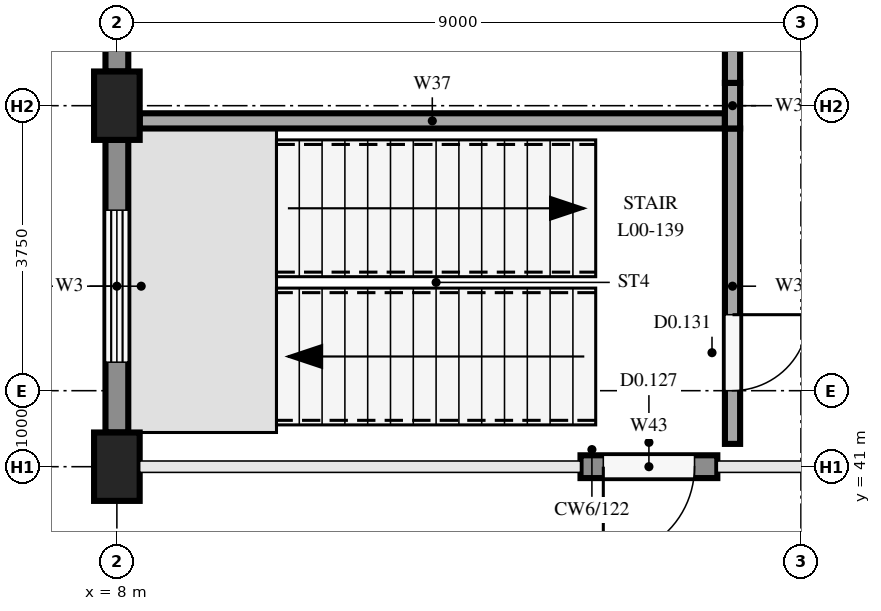
"""IFC4 building model, lengths in metres.
Left out: names, types, materials, properties, quantities, classifications, styles, units other than length and angle.
Written with IfcOpenShell. Run it as: python <this file> out.ifc"""

import sys

from ifc_helpers import new_model, si_unit, direction, frame, frame_2d, origin, origin_2d, place, context, subcontext, project, spatial, rectangle, extrude, element, fill, save


model = new_model("IFC4")
c1 = context("Model", 3, precision=1e-05, world=origin(), true_north=direction((0.0, 1.0)))
c2 = subcontext(c1, "Body", "Model", "MODEL_VIEW")
j1 = project(units=[si_unit("LENGTHUNIT", "METRE"), si_unit("PLANEANGLEUNIT", "RADIAN")], contexts=[c1])
p1 = place(None, origin())
s1 = spatial("IfcSite", under=j1, at=p1, CompositionType="ELEMENT")
p2 = place(p1, origin())
s2 = spatial("IfcBuilding", under=s1, at=p2, CompositionType="ELEMENT")
p3 = place(p2, origin())
s3 = spatial("IfcBuildingStorey", under=s2, at=p3, CompositionType="ELEMENT", Elevation=0.0)
for number, where, z_axis, x_axis in (
    (1, (8.0, 41.0, 0.0), (0.0, 0.0, 1.0), (1.0, 0.0, 0.0)),
    (2, (8.0, 45.75, 0.0), (0.0, 0.0, 1.0), (1.0, 0.0, 0.0)),
):
    element("IfcColumn", number, at=place(p3, frame(where, z_axis=z_axis, x_axis=x_axis)), inside=s3, PredefinedType="COLUMN", context=c2, shape_type="SweptSolid", body=[
        extrude(rectangle(XDim=0.6, YDim=0.9, at=origin_2d()), origin(), (0.0, 0.0, 1.0), 4.5),
    ])
p4 = place(p3, frame((8.0, 41.45, 0.0), z_axis=(0.0, 0.0, 1.0), x_axis=(0.0, 1.0, 0.0)))
e3 = element("IfcWall", 3, at=p4, inside=s3, PredefinedType="SOLIDWALL", context=c2, shape_type="SweptSolid", body=[
    extrude(rectangle(XDim=3.85, YDim=0.3, at=frame_2d((1.925, 0.0))), origin(), (0.0, 0.0, 1.0), 4.15),
])
p5 = place(p4, frame((0.925, 0.0, 1.0)))
e4 = element("IfcOpeningElement", 4, at=p5, cuts=e3, PredefinedType="OPENING", context=c2, shape_type="SweptSolid", body=[
    extrude(rectangle(XDim=2.0, YDim=2.0, at=frame_2d((1.0, 1.0))), frame((0.0, 0.16, 0.0), z_axis=(0.0, -1.0, 0.0), x_axis=(1.0, 0.0, 0.0)), (0.0, 0.0, 1.0), 0.32),
])
p6 = place(p3, frame((8.0, 46.2, 0.0), z_axis=(0.0, 0.0, 1.0), x_axis=(0.0, 1.0, 0.0)))
e5 = element("IfcWall", 5, at=p6, inside=s3, PredefinedType="SOLIDWALL", context=c2, shape_type="SweptSolid", body=[
    extrude(rectangle(XDim=3.85, YDim=0.3, at=frame_2d((1.925, 0.0))), origin(), (0.0, 0.0, 1.0), 4.15),
])
p7 = place(p6, frame((0.925, 0.0, 1.0)))
e6 = element("IfcOpeningElement", 6, at=p7, cuts=e5, PredefinedType="OPENING", context=c2, shape_type="SweptSolid", body=[
    extrude(rectangle(XDim=2.0, YDim=2.0, at=frame_2d((1.0, 1.0))), frame((0.0, 0.16, 0.0), z_axis=(0.0, -1.0, 0.0), x_axis=(1.0, 0.0, 0.0)), (0.0, 0.0, 1.0), 0.32),
])
p8 = place(p3, frame((14.1, 41.0, 0.0), z_axis=(0.0, 0.0, 1.0), x_axis=(1.0, 0.0, 0.0)))
e7 = element("IfcWall", 7, at=p8, inside=s3, PredefinedType="SOLIDWALL", context=c2, shape_type="SweptSolid", body=[
    extrude(rectangle(XDim=1.8, YDim=0.3, at=frame_2d((0.9, 0.0))), origin(), (0.0, 0.0, 1.0), 3.05),
])
p9 = place(p8, frame((0.3, 0.0, 0.0)))
e8 = element("IfcOpeningElement", 8, at=p9, cuts=e7, PredefinedType="OPENING", context=c2, shape_type="SweptSolid", body=[
    extrude(rectangle(XDim=1.2, YDim=2.1, at=frame_2d((0.6, 1.05))), frame((0.0, 0.16, 0.0), z_axis=(0.0, -1.0, 0.0), x_axis=(1.0, 0.0, 0.0)), (0.0, 0.0, 1.0), 0.32),
])
p10 = place(p3, frame((8.3, 45.55, 0.0), z_axis=(0.0, 0.0, 1.0), x_axis=(1.0, 0.0, 0.0)))
e9 = element("IfcWall", 9, at=p10, inside=s3, PredefinedType="SOLIDWALL", context=c2, shape_type="SweptSolid", body=[
    extrude(rectangle(XDim=7.7, YDim=0.2, at=frame_2d((3.85, 0.0))), origin(), (0.0, 0.0, 1.0), 3.05),
])
p11 = place(p3, frame((16.1, 41.3, 0.0), z_axis=(0.0, 0.0, 1.0), x_axis=(0.0, 1.0, 0.0)))
e10 = element("IfcWall", 10, at=p11, inside=s3, PredefinedType="SOLIDWALL", context=c2, shape_type="SweptSolid", body=[
    extrude(rectangle(XDim=4.15, YDim=0.2, at=frame_2d((2.075, 0.0))), origin(), (0.0, 0.0, 1.0), 4.15),
])
p12 = place(p11, frame((0.7, 0.0, 0.0)))
e11 = element("IfcOpeningElement", 11, at=p12, cuts=e10, PredefinedType="OPENING", context=c2, shape_type="SweptSolid", body=[
    extrude(rectangle(XDim=1.0, YDim=2.1, at=frame_2d((0.5, 1.05))), frame((0.0, 0.11, 0.0), z_axis=(0.0, -1.0, 0.0), x_axis=(1.0, 0.0, 0.0)), (0.0, 0.0, 1.0), 0.22),
])
p13 = place(p3, frame((16.1, 45.45, 0.0), z_axis=(0.0, 0.0, 1.0), x_axis=(0.0, 1.0, 0.0)))
e12 = element("IfcWall", 12, at=p13, inside=s3, PredefinedType="PARTITIONING", context=c2, shape_type="SweptSolid", body=[
    extrude(rectangle(XDim=0.6, YDim=0.2, at=frame_2d((0.3, 0.0))), origin(), (0.0, 0.0, 1.0), 3.05),
])
p14 = place(p3, frame((16.1, 46.05, 0.0), z_axis=(0.0, 0.0, 1.0), x_axis=(0.0, 1.0, 0.0)))
e13 = element("IfcWall", 13, at=p14, inside=s3, PredefinedType="PARTITIONING", context=c2, shape_type="SweptSolid", body=[
    extrude(rectangle(XDim=4.15, YDim=0.2, at=frame_2d((2.075, 0.0))), origin(), (0.0, 0.0, 1.0), 4.15),
])
p15 = place(p5, origin())
e14 = element("IfcWindow", 14, at=p15, inside=s3, PartitioningType="SINGLE_PANEL", PredefinedType="WINDOW", context=c2, shape_type="SweptSolid", body=[
    extrude(rectangle(XDim=2.0, YDim=2.0, at=frame_2d((1.0, 1.0))), frame((0.0, 0.03, 0.0), z_axis=(0.0, -1.0, 0.0), x_axis=(1.0, 0.0, 0.0)), (0.0, 0.0, 1.0), 0.06),
])
fill(e4, e14)
p16 = place(p9, frame((1.2, 0.0, 0.0), z_axis=(0.0, 0.0, 1.0), x_axis=(-1.0, 0.0, 0.0)))
e15 = element("IfcDoor", 15, at=p16, inside=s3, OperationType="SINGLE_SWING_LEFT", PredefinedType="DOOR", context=c2, shape_type="SweptSolid", body=[
    extrude(rectangle(XDim=1.2, YDim=2.1, at=frame_2d((0.6, 1.05))), frame((0.0, 0.025, 0.0), z_axis=(0.0, -1.0, 0.0), x_axis=(1.0, 0.0, 0.0)), (0.0, 0.0, 1.0), 0.05),
])
fill(e8, e15)
p17 = place(p12, frame((1.0, 0.0, 0.0), z_axis=(0.0, 0.0, 1.0), x_axis=(-1.0, 0.0, 0.0)))
e16 = element("IfcDoor", 16, at=p17, inside=s3, OperationType="SINGLE_SWING_RIGHT", PredefinedType="DOOR", context=c2, shape_type="SweptSolid", body=[
    extrude(rectangle(XDim=1.0, YDim=2.1, at=frame_2d((0.5, 1.05))), frame((0.0, 0.025, 0.0), z_axis=(0.0, -1.0, 0.0), x_axis=(1.0, 0.0, 0.0)), (0.0, 0.0, 1.0), 0.05),
])
fill(e11, e16)
save(model, sys.argv[1])
